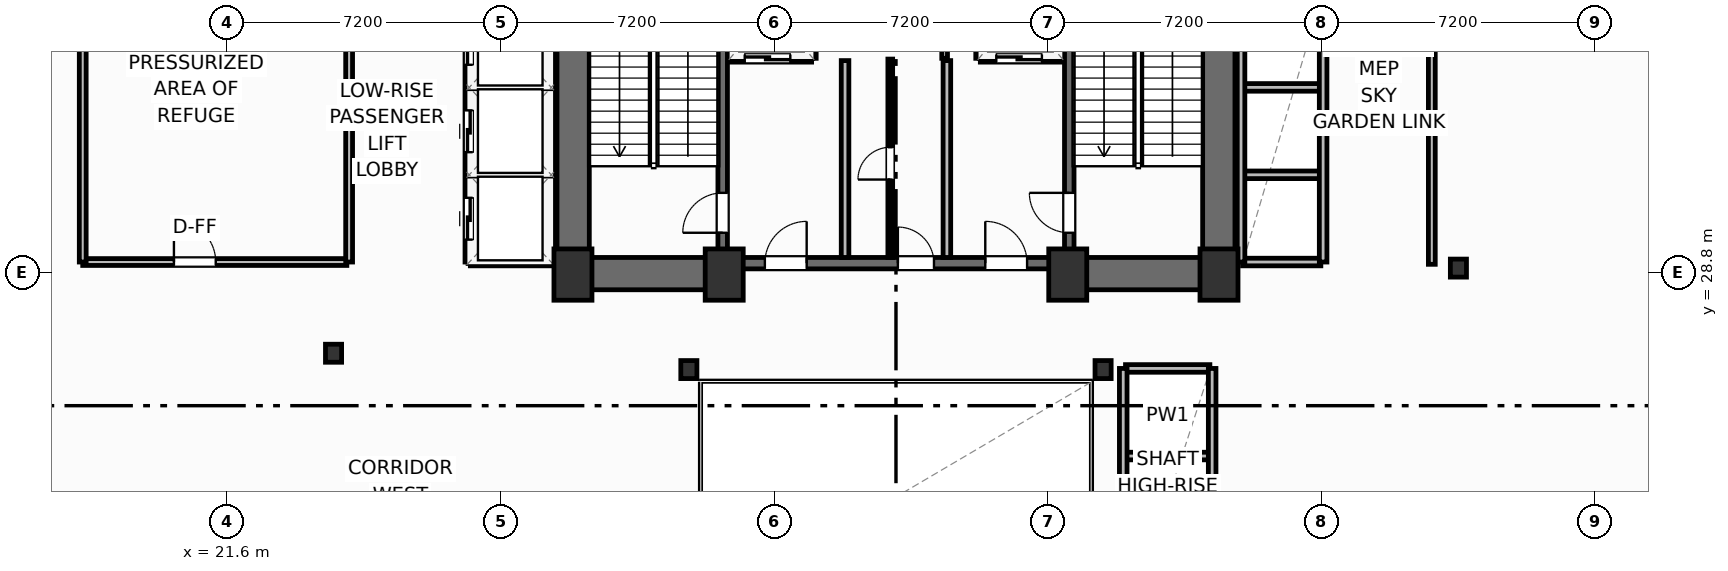
"""IFC4 building model, lengths in metres.
Left out: names, types, materials, properties, quantities, classifications, styles, units other than length and angle.
Written with IfcOpenShell. Run it as: python <this file> out.ifc"""

import sys

from ifc_helpers import new_model, si_unit, direction, frame, frame_2d, origin, origin_2d, place, context, subcontext, project, spatial, rectangle, i_section, extrude, element, fill, save


model = new_model("IFC4")
c1 = context("Model", 3, precision=1e-05, world=origin(), true_north=direction((0.0, 1.0)))
c2 = subcontext(c1, "Body", "Model", "MODEL_VIEW")
j1 = project(units=[si_unit("LENGTHUNIT", "METRE"), si_unit("PLANEANGLEUNIT", "RADIAN")], contexts=[c1])
p1 = place(None, origin())
s1 = spatial("IfcSite", under=j1, at=p1, CompositionType="ELEMENT")
p2 = place(p1, origin())
s2 = spatial("IfcBuilding", under=s1, at=p2, CompositionType="ELEMENT")
p3 = place(p2, frame((0.0, 0.0, 71.4)))
s3 = spatial("IfcBuildingStorey", under=s2, at=p3, CompositionType="ELEMENT", Elevation=71.4)
for number, where, z_axis, x_axis in (
    (1, (30.7, 28.75, 0.0), (0.0, 0.0, 1.0), (1.0, 0.0, 0.0)),
    (2, (34.68, 28.75, 0.0), (0.0, 0.0, 1.0), (1.0, 0.0, 0.0)),
    (3, (43.72, 28.75, 0.0), (0.0, 0.0, 1.0), (1.0, 0.0, 0.0)),
    (4, (47.7, 28.75, 0.0), (0.0, 0.0, 1.0), (1.0, 0.0, 0.0)),
):
    element("IfcColumn", number, at=place(p3, frame(where, z_axis=z_axis, x_axis=x_axis)), inside=s3, PredefinedType="COLUMN", context=c2, shape_type="SweptSolid", body=[
        extrude(rectangle(XDim=1.0, YDim=1.35, at=origin_2d()), origin(), (0.0, 0.0, 1.0), 4.8),
    ])
for number, where, z_axis, x_axis in (
    (5, (33.75, 26.25, 0.0), (0.0, 0.0, 1.0), (1.0, 0.0, 0.0)),
    (6, (44.65, 26.25, 0.0), (0.0, 0.0, 1.0), (1.0, 0.0, 0.0)),
    (7, (24.4, 26.68, 0.0), (0.0, 0.0, 1.0), (1.0, 0.0, 0.0)),
    (8, (54.0, 28.92, 0.0), (0.0, 0.0, 1.0), (1.0, 0.0, 0.0)),
):
    element("IfcColumn", number, at=place(p3, frame(where, z_axis=z_axis, x_axis=x_axis)), inside=s3, PredefinedType="COLUMN", context=c2, shape_type="SweptSolid", body=[
        extrude(i_section(OverallWidth=0.424, OverallDepth=0.474, WebThickness=0.048, FlangeThickness=0.077, FilletRadius=0.025, at=origin_2d()), origin(), (0.0, 0.0, 1.0), 4.8),
    ])
for number, where, z_axis, x_axis in (
    (9, (30.705, 29.2, 0.0), (0.0, 0.0, 1.0), (0.0, 1.0, 0.0)),
    (10, (47.695, 29.2, 0.0), (0.0, 0.0, 1.0), (0.0, 1.0, 0.0)),
):
    element("IfcWall", number, at=place(p3, frame(where, z_axis=z_axis, x_axis=x_axis)), inside=s3, PredefinedType="SHEAR", context=c2, shape_type="SweptSolid", body=[
        extrude(rectangle(XDim=9.22, YDim=0.85, at=frame_2d((4.61, 0.0))), origin(), (0.0, 0.0, 1.0), 4.55),
    ])
for number, where, z_axis, x_axis in (
    (11, (30.28, 28.775, 0.0), (0.0, 0.0, 1.0), (1.0, 0.0, 0.0)),
    (12, (43.6, 28.775, 0.0), (0.0, 0.0, 1.0), (1.0, 0.0, 0.0)),
):
    element("IfcWall", number, at=place(p3, frame(where, z_axis=z_axis, x_axis=x_axis)), inside=s3, PredefinedType="SHEAR", context=c2, shape_type="SweptSolid", body=[
        extrude(rectangle(XDim=4.52, YDim=0.85, at=frame_2d((2.26, 0.0))), origin(), (0.0, 0.0, 1.0), 4.55),
    ])
p4 = place(p3, frame((34.8, 29.05, 0.0), z_axis=(0.0, 0.0, 1.0), x_axis=(1.0, 0.0, 0.0)))
e13 = element("IfcWall", 13, at=p4, inside=s3, PredefinedType="SHEAR", context=c2, shape_type="SweptSolid", body=[
    extrude(rectangle(XDim=8.8, YDim=0.3, at=frame_2d((4.4, 0.0))), origin(), (0.0, 0.0, 1.0), 4.55),
])
p5 = place(p4, frame((0.95, 0.0, 0.0)))
e14 = element("IfcOpeningElement", 14, at=p5, cuts=e13, PredefinedType="OPENING", context=c2, shape_type="SweptSolid", body=[
    extrude(rectangle(XDim=1.1, YDim=2.15, at=frame_2d((0.55, 1.075))), frame((0.0, 0.16, 0.0), z_axis=(0.0, -1.0, 0.0), x_axis=(1.0, 0.0, 0.0)), (0.0, 0.0, 1.0), 0.32),
])
p6 = place(p4, frame((6.75, 0.0, 0.0)))
e15 = element("IfcOpeningElement", 15, at=p6, cuts=e13, PredefinedType="OPENING", context=c2, shape_type="SweptSolid", body=[
    extrude(rectangle(XDim=1.1, YDim=2.15, at=frame_2d((0.55, 1.075))), frame((0.0, 0.16, 0.0), z_axis=(0.0, -1.0, 0.0), x_axis=(1.0, 0.0, 0.0)), (0.0, 0.0, 1.0), 0.32),
])
p7 = place(p4, frame((4.45, 0.0, 0.0)))
e16 = element("IfcOpeningElement", 16, at=p7, cuts=e13, PredefinedType="OPENING", context=c2, shape_type="SweptSolid", body=[
    extrude(rectangle(XDim=0.95, YDim=2.15, at=frame_2d((0.475, 1.075))), frame((0.0, 0.16, 0.0), z_axis=(0.0, -1.0, 0.0), x_axis=(1.0, 0.0, 0.0)), (0.0, 0.0, 1.0), 0.32),
])
p8 = place(p3, frame((34.64, 29.2, 0.0), z_axis=(0.0, 0.0, 1.0), x_axis=(0.0, 1.0, 0.0)))
e17 = element("IfcWall", 17, at=p8, inside=s3, PredefinedType="SHEAR", context=c2, shape_type="SweptSolid", body=[
    extrude(rectangle(XDim=9.22, YDim=0.25, at=frame_2d((4.61, 0.0))), origin(), (0.0, 0.0, 1.0), 4.55),
])
p9 = place(p8, frame((0.65, 0.0, 0.0)))
e18 = element("IfcOpeningElement", 18, at=p9, cuts=e17, PredefinedType="OPENING", context=c2, shape_type="SweptSolid", body=[
    extrude(rectangle(XDim=1.05, YDim=2.15, at=frame_2d((0.525, 1.075))), frame((0.0, 0.135, 0.0), z_axis=(0.0, -1.0, 0.0), x_axis=(1.0, 0.0, 0.0)), (0.0, 0.0, 1.0), 0.27),
])
p10 = place(p3, frame((43.76, 29.2, 0.0), z_axis=(0.0, 0.0, 1.0), x_axis=(0.0, 1.0, 0.0)))
e19 = element("IfcWall", 19, at=p10, inside=s3, PredefinedType="SHEAR", context=c2, shape_type="SweptSolid", body=[
    extrude(rectangle(XDim=9.22, YDim=0.25, at=frame_2d((4.61, 0.0))), origin(), (0.0, 0.0, 1.0), 4.55),
])
p11 = place(p10, frame((0.65, 0.0, 0.0)))
e20 = element("IfcOpeningElement", 20, at=p11, cuts=e19, PredefinedType="OPENING", context=c2, shape_type="SweptSolid", body=[
    extrude(rectangle(XDim=1.05, YDim=2.15, at=frame_2d((0.525, 1.075))), frame((0.0, 0.135, 0.0), z_axis=(0.0, -1.0, 0.0), x_axis=(1.0, 0.0, 0.0)), (0.0, 0.0, 1.0), 0.27),
])
p12 = place(p3, frame((18.646, 55.739, 0.0), z_axis=(0.0, 0.0, 1.0), x_axis=(0.935222250741, -0.354061211825, 0.0)))
e21 = element("IfcWall", 21, at=p12, inside=s3, PredefinedType="SOLIDWALL", context=c2, shape_type="SweptSolid", body=[
    extrude(rectangle(XDim=60.0, YDim=0.22, at=frame_2d((30.0, 0.0))), origin(), (0.0, 0.0, 1.0), 3.83),
])
p13 = place(p12, frame((27.647, 0.0, 0.0)))
e22 = element("IfcOpeningElement", 22, at=p13, cuts=e21, PredefinedType="OPENING", context=c2, shape_type="SweptSolid", body=[
    extrude(rectangle(XDim=1.85, YDim=2.3, at=frame_2d((0.925, 1.15))), frame((0.0, 0.12, 0.0), z_axis=(0.0, -1.0, 0.0), x_axis=(1.0, 0.0, 0.0)), (0.0, 0.0, 1.0), 0.24),
])
p14 = place(p12, frame((0.55, 0.0, 0.75)))
e23 = element("IfcOpeningElement", 23, at=p14, cuts=e21, PredefinedType="OPENING", context=c2, shape_type="SweptSolid", body=[
    extrude(rectangle(XDim=1.65, YDim=1.65, at=frame_2d((0.825, 0.825))), frame((0.0, 0.12, 0.0), z_axis=(0.0, -1.0, 0.0), x_axis=(1.0, 0.0, 0.0)), (0.0, 0.0, 1.0), 0.24),
])
p15 = place(p12, frame((57.8, 0.0, 0.75)))
e24 = element("IfcOpeningElement", 24, at=p15, cuts=e21, PredefinedType="OPENING", context=c2, shape_type="SweptSolid", body=[
    extrude(rectangle(XDim=1.65, YDim=1.65, at=frame_2d((0.825, 0.825))), frame((0.0, 0.12, 0.0), z_axis=(0.0, -1.0, 0.0), x_axis=(1.0, 0.0, 0.0)), (0.0, 0.0, 1.0), 0.24),
])
p16 = place(p3, frame((17.8, 29.08, 0.0), z_axis=(0.0, 0.0, 1.0), x_axis=(1.0, 0.0, 0.0)))
e25 = element("IfcWall", 25, at=p16, inside=s3, PredefinedType="PARTITIONING", context=c2, shape_type="SweptSolid", body=[
    extrude(rectangle(XDim=6.95, YDim=0.18, at=frame_2d((3.475, 0.0))), origin(), (0.0, 0.0, 1.0), 4.55),
])
p17 = place(p16, frame((2.4, 0.0, 0.0)))
e26 = element("IfcOpeningElement", 26, at=p17, cuts=e25, PredefinedType="OPENING", context=c2, shape_type="SweptSolid", body=[
    extrude(rectangle(XDim=1.1, YDim=2.15, at=frame_2d((0.55, 1.075))), frame((0.0, 0.1, 0.0), z_axis=(0.0, -1.0, 0.0), x_axis=(1.0, 0.0, 0.0)), (0.0, 0.0, 1.0), 0.2),
])
p18 = place(p3, frame((17.8, 29.08, 0.0), z_axis=(0.0, 0.0, 1.0), x_axis=(0.0, 1.0, 0.0)))
e27 = element("IfcWall", 27, at=p18, inside=s3, PredefinedType="PARTITIONING", context=c2, shape_type="SweptSolid", body=[
    extrude(rectangle(XDim=7.6, YDim=0.18, at=frame_2d((3.8, 0.0))), origin(), (0.0, 0.0, 1.0), 4.55),
])
p19 = place(p3, frame((24.81, 29.08, 0.0), z_axis=(0.0, 0.0, 1.0), x_axis=(0.0, 1.0, 0.0)))
e28 = element("IfcWall", 28, at=p19, inside=s3, PredefinedType="PARTITIONING", context=c2, shape_type="SweptSolid", body=[
    extrude(rectangle(XDim=7.6, YDim=0.18, at=frame_2d((3.8, 0.0))), origin(), (0.0, 0.0, 1.0), 4.55),
])
p20 = place(p19, frame((5.8, 0.0, 0.0)))
e29 = element("IfcOpeningElement", 29, at=p20, cuts=e28, PredefinedType="OPENING", context=c2, shape_type="SweptSolid", body=[
    extrude(rectangle(XDim=1.1, YDim=2.15, at=frame_2d((0.55, 1.075))), frame((0.0, 0.1, 0.0), z_axis=(0.0, -1.0, 0.0), x_axis=(1.0, 0.0, 0.0)), (0.0, 0.0, 1.0), 0.2),
])
p21 = place(p3, frame((53.3, 29.02, 0.0), z_axis=(0.0, 0.0, 1.0), x_axis=(0.0, 1.0, 0.0)))
e30 = element("IfcWall", 30, at=p21, inside=s3, PredefinedType="PARTITIONING", context=c2, shape_type="SweptSolid", body=[
    extrude(rectangle(XDim=10.28, YDim=0.18, at=frame_2d((5.14, 0.0))), origin(), (0.0, 0.0, 1.0), 4.55),
])
for number, where, z_axis, x_axis in (
    (31, (37.86, 29.2, 0.0), (0.0, 0.0, 1.0), (0.0, 1.0, 0.0)),
    (32, (40.54, 29.2, 0.0), (0.0, 0.0, 1.0), (0.0, 1.0, 0.0)),
):
    element("IfcWall", number, at=place(p3, frame(where, z_axis=z_axis, x_axis=x_axis)), inside=s3, PredefinedType="PARTITIONING", context=c2, shape_type="SweptSolid", body=[
        extrude(rectangle(XDim=5.18, YDim=0.2, at=frame_2d((2.59, 0.0))), origin(), (0.0, 0.0, 1.0), 4.55),
    ])
p22 = place(p3, frame((34.8, 34.44, 0.0), z_axis=(0.0, 0.0, 1.0), x_axis=(1.0, 0.0, 0.0)))
e33 = element("IfcWall", 33, at=p22, inside=s3, PredefinedType="PARTITIONING", context=c2, shape_type="SweptSolid", body=[
    extrude(rectangle(XDim=2.18, YDim=0.2, at=frame_2d((1.09, 0.0))), origin(), (0.0, 0.0, 1.0), 4.55),
])
p23 = place(p22, frame((0.42, 0.0, 0.0)))
e34 = element("IfcOpeningElement", 34, at=p23, cuts=e33, PredefinedType="OPENING", context=c2, shape_type="SweptSolid", body=[
    extrude(rectangle(XDim=1.2, YDim=2.2, at=frame_2d((0.6, 1.1))), frame((0.0, 0.11, 0.0), z_axis=(0.0, -1.0, 0.0), x_axis=(1.0, 0.0, 0.0)), (0.0, 0.0, 1.0), 0.22),
])
p24 = place(p3, frame((37.0, 34.44, 0.0), z_axis=(0.0, 0.0, 1.0), x_axis=(0.0, 1.0, 0.0)))
e35 = element("IfcWall", 35, at=p24, inside=s3, PredefinedType="PARTITIONING", context=c2, shape_type="SweptSolid", body=[
    extrude(rectangle(XDim=3.9, YDim=0.2, at=frame_2d((1.95, 0.0))), origin(), (0.0, 0.0, 1.0), 4.55),
])
p25 = place(p3, frame((41.42, 34.44, 0.0), z_axis=(0.0, 0.0, 1.0), x_axis=(1.0, 0.0, 0.0)))
e36 = element("IfcWall", 36, at=p25, inside=s3, PredefinedType="PARTITIONING", context=c2, shape_type="SweptSolid", body=[
    extrude(rectangle(XDim=2.18, YDim=0.2, at=frame_2d((1.09, 0.0))), origin(), (0.0, 0.0, 1.0), 4.55),
])
p26 = place(p25, frame((0.42, 0.0, 0.0)))
e37 = element("IfcOpeningElement", 37, at=p26, cuts=e36, PredefinedType="OPENING", context=c2, shape_type="SweptSolid", body=[
    extrude(rectangle(XDim=1.2, YDim=2.2, at=frame_2d((0.6, 1.1))), frame((0.0, 0.11, 0.0), z_axis=(0.0, -1.0, 0.0), x_axis=(1.0, 0.0, 0.0)), (0.0, 0.0, 1.0), 0.22),
])
p27 = place(p3, frame((41.4, 34.44, 0.0), z_axis=(0.0, 0.0, 1.0), x_axis=(0.0, 1.0, 0.0)))
e38 = element("IfcWall", 38, at=p27, inside=s3, PredefinedType="PARTITIONING", context=c2, shape_type="SweptSolid", body=[
    extrude(rectangle(XDim=3.9, YDim=0.2, at=frame_2d((1.95, 0.0))), origin(), (0.0, 0.0, 1.0), 4.55),
])
p28 = place(p3, frame((40.48, 34.44, 0.0), z_axis=(0.0, 0.0, 1.0), x_axis=(0.0, 1.0, 0.0)))
e39 = element("IfcWall", 39, at=p28, inside=s3, PredefinedType="PARTITIONING", context=c2, shape_type="SweptSolid", body=[
    extrude(rectangle(XDim=1.52, YDim=0.15, at=frame_2d((0.76, 0.0))), origin(), (0.0, 0.0, 1.0), 4.55),
])
p29 = place(p28, frame((0.32, 0.0, 0.0)))
e40 = element("IfcOpeningElement", 40, at=p29, cuts=e39, PredefinedType="OPENING", context=c2, shape_type="SweptSolid", body=[
    extrude(rectangle(XDim=0.85, YDim=2.05, at=frame_2d((0.425, 1.025))), frame((0.0, 0.085, 0.0), z_axis=(0.0, -1.0, 0.0), x_axis=(1.0, 0.0, 0.0)), (0.0, 0.0, 1.0), 0.17),
])
p30 = place(p3, frame((39.05, 29.2, 0.0), z_axis=(0.0, 0.0, 1.0), x_axis=(0.0, 1.0, 0.0)))
e41 = element("IfcWall", 41, at=p30, inside=s3, PredefinedType="PARTITIONING", context=c2, shape_type="SweptSolid", body=[
    extrude(rectangle(XDim=5.22, YDim=0.125, at=frame_2d((2.61, 0.0))), origin(), (0.0, 0.0, 1.0), 4.55),
])
p31 = place(p30, frame((2.05, 0.0, 0.0)))
e42 = element("IfcOpeningElement", 42, at=p31, cuts=e41, PredefinedType="OPENING", context=c2, shape_type="SweptSolid", body=[
    extrude(rectangle(XDim=0.85, YDim=2.05, at=frame_2d((0.425, 1.025))), frame((0.0, 0.073, 0.0), z_axis=(0.0, -1.0, 0.0), x_axis=(1.0, 0.0, 0.0)), (0.0, 0.0, 1.0), 0.145),
])
for number, where, z_axis, x_axis in (
    (43, (28.02, 31.375, 0.0), (0.0, 0.0, 1.0), (1.0, 0.0, 0.0)),
    (44, (28.02, 33.675, 0.0), (0.0, 0.0, 1.0), (1.0, 0.0, 0.0)),
):
    element("IfcWall", number, at=place(p3, frame(where, z_axis=z_axis, x_axis=x_axis)), inside=s3, PredefinedType="PARTITIONING", context=c2, shape_type="SweptSolid", body=[
        extrude(rectangle(XDim=2.06, YDim=0.2, at=frame_2d((1.03, 0.0))), origin(), (0.0, 0.0, 1.0), 4.55),
    ])
p32 = place(p3, frame((28.0, 29.08, 0.0), z_axis=(0.0, 0.0, 1.0), x_axis=(1.0, 0.0, 0.0)))
e45 = element("IfcWall", 45, at=p32, inside=s3, PredefinedType="PARTITIONING", context=c2, shape_type="SweptSolid", body=[
    extrude(rectangle(XDim=2.1, YDim=0.2, at=frame_2d((1.05, 0.0))), origin(), (0.0, 0.0, 1.0), 4.55),
])
p33 = place(p3, frame((30.12, 29.08, 0.0), z_axis=(0.0, 0.0, 1.0), x_axis=(0.0, 1.0, 0.0)))
e46 = element("IfcWall", 46, at=p33, inside=s3, PredefinedType="PARTITIONING", context=c2, shape_type="SweptSolid", body=[
    extrude(rectangle(XDim=6.89, YDim=0.2, at=frame_2d((3.445, 0.0))), origin(), (0.0, 0.0, 1.0), 4.55),
])
p34 = place(p3, frame((27.96, 29.08, 0.0), z_axis=(0.0, 0.0, 1.0), x_axis=(0.0, 1.0, 0.0)))
e47 = element("IfcWall", 47, at=p34, inside=s3, PredefinedType="PARTITIONING", context=c2, shape_type="SweptSolid", body=[
    extrude(rectangle(XDim=6.89, YDim=0.2, at=frame_2d((3.445, 0.0))), origin(), (0.0, 0.0, 1.0), 4.55),
])
p35 = place(p34, frame((0.59, 0.0, 0.0)))
e48 = element("IfcOpeningElement", 48, at=p35, cuts=e47, PredefinedType="OPENING", context=c2, shape_type="SweptSolid", body=[
    extrude(rectangle(XDim=1.1, YDim=2.15, at=frame_2d((0.55, 1.075))), frame((0.0, 0.11, 0.0), z_axis=(0.0, -1.0, 0.0), x_axis=(1.0, 0.0, 0.0)), (0.0, 0.0, 1.0), 0.22),
])
p36 = place(p34, frame((2.89, 0.0, 0.0)))
e49 = element("IfcOpeningElement", 49, at=p36, cuts=e47, PredefinedType="OPENING", context=c2, shape_type="SweptSolid", body=[
    extrude(rectangle(XDim=1.1, YDim=2.15, at=frame_2d((0.55, 1.075))), frame((0.0, 0.11, 0.0), z_axis=(0.0, -1.0, 0.0), x_axis=(1.0, 0.0, 0.0)), (0.0, 0.0, 1.0), 0.22),
])
p37 = place(p34, frame((5.19, 0.0, 0.0)))
e50 = element("IfcOpeningElement", 50, at=p37, cuts=e47, PredefinedType="OPENING", context=c2, shape_type="SweptSolid", body=[
    extrude(rectangle(XDim=1.1, YDim=2.15, at=frame_2d((0.55, 1.075))), frame((0.0, 0.11, 0.0), z_axis=(0.0, -1.0, 0.0), x_axis=(1.0, 0.0, 0.0)), (0.0, 0.0, 1.0), 0.22),
])
for number, where, z_axis, x_axis in (
    (51, (48.32, 31.375, 0.0), (0.0, 0.0, 1.0), (1.0, 0.0, 0.0)),
    (52, (48.32, 33.675, 0.0), (0.0, 0.0, 1.0), (1.0, 0.0, 0.0)),
):
    element("IfcWall", number, at=place(p3, frame(where, z_axis=z_axis, x_axis=x_axis)), inside=s3, PredefinedType="PARTITIONING", context=c2, shape_type="SweptSolid", body=[
        extrude(rectangle(XDim=2.06, YDim=0.2, at=frame_2d((1.03, 0.0))), origin(), (0.0, 0.0, 1.0), 4.55),
    ])
p38 = place(p3, frame((48.32, 29.08, 0.0), z_axis=(0.0, 0.0, 1.0), x_axis=(1.0, 0.0, 0.0)))
e53 = element("IfcWall", 53, at=p38, inside=s3, PredefinedType="PARTITIONING", context=c2, shape_type="SweptSolid", body=[
    extrude(rectangle(XDim=2.06, YDim=0.2, at=frame_2d((1.03, 0.0))), origin(), (0.0, 0.0, 1.0), 3.762),
])
for number, where, z_axis, x_axis in (
    (54, (48.28, 29.08, 0.0), (0.0, 0.0, 1.0), (0.0, 1.0, 0.0)),
    (55, (50.44, 29.08, 0.0), (0.0, 0.0, 1.0), (0.0, 1.0, 0.0)),
):
    element("IfcWall", number, at=place(p3, frame(where, z_axis=z_axis, x_axis=x_axis)), inside=s3, PredefinedType="PARTITIONING", context=c2, shape_type="SweptSolid", body=[
        extrude(rectangle(XDim=6.89, YDim=0.2, at=frame_2d((3.445, 0.0))), origin(), (0.0, 0.0, 1.0), 4.55),
    ])
for number, where, z_axis, x_axis in (
    (56, (45.24, 23.975, 0.0), (0.0, 0.0, 1.0), (1.0, 0.0, 0.0)),
    (57, (45.24, 26.28, 0.0), (0.0, 0.0, 1.0), (1.0, 0.0, 0.0)),
):
    element("IfcWall", number, at=place(p3, frame(where, z_axis=z_axis, x_axis=x_axis)), inside=s3, PredefinedType="PARTITIONING", context=c2, shape_type="SweptSolid", body=[
        extrude(rectangle(XDim=2.22, YDim=0.2, at=frame_2d((1.11, 0.0))), origin(), (0.0, 0.0, 1.0), 4.55),
    ])
for number, where, z_axis, x_axis in (
    (58, (45.18, 19.38, 0.0), (0.0, 0.0, 1.0), (0.0, 1.0, 0.0)),
    (59, (47.52, 19.38, 0.0), (0.0, 0.0, 1.0), (0.0, 1.0, 0.0)),
):
    element("IfcWall", number, at=place(p3, frame(where, z_axis=z_axis, x_axis=x_axis)), inside=s3, PredefinedType="PARTITIONING", context=c2, shape_type="SweptSolid", body=[
        extrude(rectangle(XDim=6.9, YDim=0.2, at=frame_2d((3.45, 0.0))), origin(), (0.0, 0.0, 1.0), 4.55),
    ])
p39 = place(p17, origin())
e60 = element("IfcDoor", 60, at=p39, inside=s3, OperationType="SINGLE_SWING_LEFT", PredefinedType="DOOR", context=c2, shape_type="SweptSolid", body=[
    extrude(rectangle(XDim=1.1, YDim=2.15, at=frame_2d((0.55, 1.075))), frame((0.0, 0.025, 0.0), z_axis=(0.0, -1.0, 0.0), x_axis=(1.0, 0.0, 0.0)), (0.0, 0.0, 1.0), 0.05),
])
fill(e26, e60)
p40 = place(p9, origin())
e61 = element("IfcDoor", 61, at=p40, inside=s3, OperationType="SINGLE_SWING_LEFT", PredefinedType="DOOR", context=c2, shape_type="SweptSolid", body=[
    extrude(rectangle(XDim=1.05, YDim=2.15, at=frame_2d((0.525, 1.075))), frame((0.0, 0.025, 0.0), z_axis=(0.0, -1.0, 0.0), x_axis=(1.0, 0.0, 0.0)), (0.0, 0.0, 1.0), 0.05),
])
fill(e18, e61)
p41 = place(p11, origin())
e62 = element("IfcDoor", 62, at=p41, inside=s3, OperationType="SINGLE_SWING_RIGHT", PredefinedType="DOOR", context=c2, shape_type="SweptSolid", body=[
    extrude(rectangle(XDim=1.05, YDim=2.15, at=frame_2d((0.525, 1.075))), frame((0.0, 0.025, 0.0), z_axis=(0.0, -1.0, 0.0), x_axis=(1.0, 0.0, 0.0)), (0.0, 0.0, 1.0), 0.05),
])
fill(e20, e62)
p42 = place(p5, origin())
e63 = element("IfcDoor", 63, at=p42, inside=s3, OperationType="SINGLE_SWING_RIGHT", PredefinedType="DOOR", context=c2, shape_type="SweptSolid", body=[
    extrude(rectangle(XDim=1.1, YDim=2.15, at=frame_2d((0.55, 1.075))), frame((0.0, 0.025, 0.0), z_axis=(0.0, -1.0, 0.0), x_axis=(1.0, 0.0, 0.0)), (0.0, 0.0, 1.0), 0.05),
])
fill(e14, e63)
p43 = place(p6, origin())
e64 = element("IfcDoor", 64, at=p43, inside=s3, OperationType="SINGLE_SWING_LEFT", PredefinedType="DOOR", context=c2, shape_type="SweptSolid", body=[
    extrude(rectangle(XDim=1.1, YDim=2.15, at=frame_2d((0.55, 1.075))), frame((0.0, 0.025, 0.0), z_axis=(0.0, -1.0, 0.0), x_axis=(1.0, 0.0, 0.0)), (0.0, 0.0, 1.0), 0.05),
])
fill(e15, e64)
p44 = place(p23, origin())
e65 = element("IfcDoor", 65, at=p44, inside=s3, OperationType="SLIDING_TO_LEFT", PredefinedType="DOOR", context=c2, shape_type="SweptSolid", body=[
    extrude(rectangle(XDim=1.2, YDim=2.2, at=frame_2d((0.6, 1.1))), frame((0.0, 0.025, 0.0), z_axis=(0.0, -1.0, 0.0), x_axis=(1.0, 0.0, 0.0)), (0.0, 0.0, 1.0), 0.05),
])
fill(e34, e65)
p45 = place(p26, origin())
e66 = element("IfcDoor", 66, at=p45, inside=s3, OperationType="SLIDING_TO_LEFT", PredefinedType="DOOR", context=c2, shape_type="SweptSolid", body=[
    extrude(rectangle(XDim=1.2, YDim=2.2, at=frame_2d((0.6, 1.1))), frame((0.0, 0.025, 0.0), z_axis=(0.0, -1.0, 0.0), x_axis=(1.0, 0.0, 0.0)), (0.0, 0.0, 1.0), 0.05),
])
fill(e37, e66)
p46 = place(p31, origin())
e67 = element("IfcDoor", 67, at=p46, inside=s3, OperationType="SINGLE_SWING_LEFT", PredefinedType="DOOR", context=c2, shape_type="SweptSolid", body=[
    extrude(rectangle(XDim=0.85, YDim=2.05, at=frame_2d((0.425, 1.025))), frame((0.0, 0.025, 0.0), z_axis=(0.0, -1.0, 0.0), x_axis=(1.0, 0.0, 0.0)), (0.0, 0.0, 1.0), 0.05),
])
fill(e42, e67)
p47 = place(p7, origin())
e68 = element("IfcDoor", 68, at=p47, inside=s3, OperationType="SINGLE_SWING_LEFT", PredefinedType="DOOR", context=c2, shape_type="SweptSolid", body=[
    extrude(rectangle(XDim=0.95, YDim=2.15, at=frame_2d((0.475, 1.075))), frame((0.0, 0.025, 0.0), z_axis=(0.0, -1.0, 0.0), x_axis=(1.0, 0.0, 0.0)), (0.0, 0.0, 1.0), 0.05),
])
fill(e16, e68)
p48 = place(p35, origin())
e69 = element("IfcDoor", 69, at=p48, inside=s3, OperationType="SLIDING_TO_LEFT", PredefinedType="DOOR", context=c2, shape_type="SweptSolid", body=[
    extrude(rectangle(XDim=1.1, YDim=2.15, at=frame_2d((0.55, 1.075))), frame((0.0, 0.025, 0.0), z_axis=(0.0, -1.0, 0.0), x_axis=(1.0, 0.0, 0.0)), (0.0, 0.0, 1.0), 0.05),
])
fill(e48, e69)
p49 = place(p36, origin())
e70 = element("IfcDoor", 70, at=p49, inside=s3, OperationType="SLIDING_TO_LEFT", PredefinedType="DOOR", context=c2, shape_type="SweptSolid", body=[
    extrude(rectangle(XDim=1.1, YDim=2.15, at=frame_2d((0.55, 1.075))), frame((0.0, 0.025, 0.0), z_axis=(0.0, -1.0, 0.0), x_axis=(1.0, 0.0, 0.0)), (0.0, 0.0, 1.0), 0.05),
])
fill(e49, e70)
p50 = place(p37, origin())
e71 = element("IfcDoor", 71, at=p50, inside=s3, OperationType="SLIDING_TO_LEFT", PredefinedType="DOOR", context=c2, shape_type="SweptSolid", body=[
    extrude(rectangle(XDim=1.1, YDim=2.15, at=frame_2d((0.55, 1.075))), frame((0.0, 0.025, 0.0), z_axis=(0.0, -1.0, 0.0), x_axis=(1.0, 0.0, 0.0)), (0.0, 0.0, 1.0), 0.05),
])
fill(e50, e71)
save(model, sys.argv[1])
